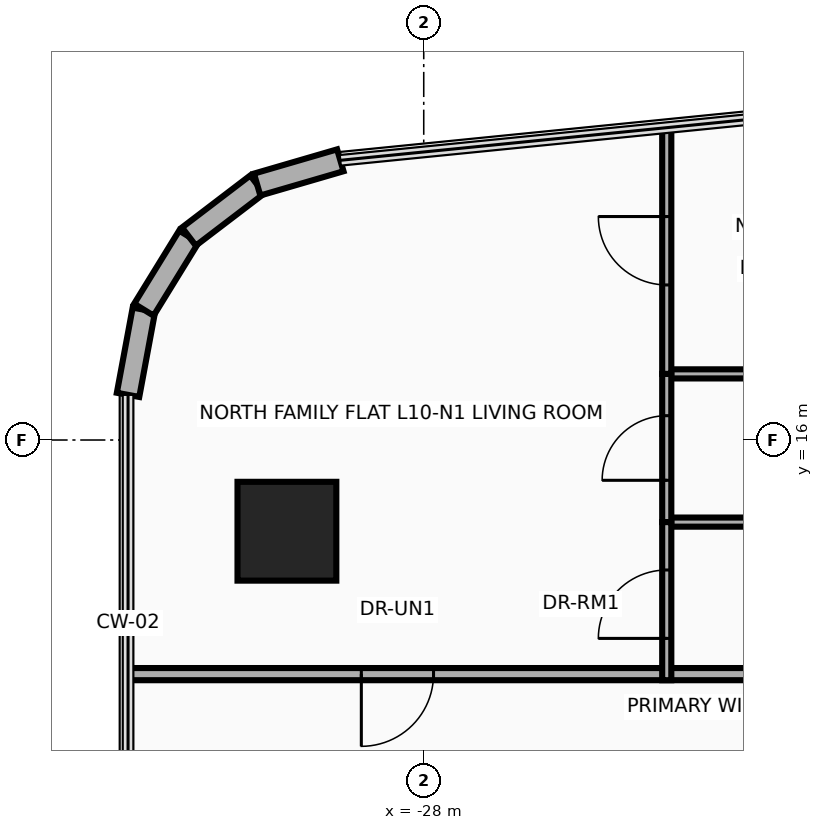
"""IFC4 building model, lengths in metres.
Left out: names, types, materials, properties, quantities, classifications, styles, units other than length and angle.
Written with IfcOpenShell. Run it as: python <this file> out.ifc"""

import sys

from ifc_helpers import new_model, si_unit, direction, frame, frame_2d, origin, origin_2d, place, context, subcontext, project, spatial, rectangle, circle, extrude, source, transform, mapped, element, fill, save


model = new_model("IFC4")
c1 = context("Model", 3, precision=1e-05, world=origin(), true_north=direction((0.0, 1.0)))
c2 = subcontext(c1, "Body", "Model", "MODEL_VIEW")
j1 = project(units=[si_unit("LENGTHUNIT", "METRE"), si_unit("PLANEANGLEUNIT", "RADIAN")], contexts=[c1])
p1 = place(None, origin())
s1 = spatial("IfcSite", under=j1, at=p1, CompositionType="ELEMENT")
p2 = place(p1, origin())
s2 = spatial("IfcBuilding", under=s1, at=p2, CompositionType="ELEMENT")
p3 = place(p2, frame((0.0, 0.0, 44.5)))
s3 = spatial("IfcBuildingStorey", under=s2, at=p3, CompositionType="ELEMENT", Elevation=44.5)
m1 = source(origin(), c2, "Body", "SweptSolid", [
    extrude(circle(Radius=0.65, at=origin_2d()), origin(), (0.0, 0.0, 1.0), 3.7),
])
p4 = place(p3, frame((-29.8, 14.8, 0.0), z_axis=(0.0, 0.0, 1.0), x_axis=(1.0, 0.0, 0.0)))
e1 = element("IfcColumn", 1, at=p4, inside=s3, PredefinedType="COLUMN", context=c2, shape_type="MappedRepresentation", body=[
    mapped(m1, transform((0.0, 0.0, 0.0), x_axis=(1.0, 0.0, 0.0), y_axis=(0.0, 1.0, 0.0), z_axis=(0.0, 0.0, 1.0), scale=1.0)),
])
p5 = place(p3, frame((-31.89, 16.594, 0.0), z_axis=(0.0, 0.0, 1.0), x_axis=(0.182748995683, 0.9831596028, 0.0)))
e2 = element("IfcWall", 2, at=p5, inside=s3, PredefinedType="SOLIDWALL", context=c2, shape_type="SweptSolid", body=[
    extrude(rectangle(XDim=1.14, YDim=0.3, at=frame_2d((0.57, 0.0))), origin(), (0.0, 0.0, 1.0), 3.46),
])
p6 = place(p3, frame((-31.682, 17.714, 0.0), z_axis=(0.0, 0.0, 1.0), x_axis=(0.524157723014, 0.8516212077, 0.0)))
e3 = element("IfcWall", 3, at=p6, inside=s3, PredefinedType="SOLIDWALL", context=c2, shape_type="SweptSolid", body=[
    extrude(rectangle(XDim=1.129, YDim=0.3, at=frame_2d((0.565, 0.0))), origin(), (0.0, 0.0, 1.0), 3.46),
])
p7 = place(p3, frame((-31.09, 18.676, 0.0), z_axis=(0.0, 0.0, 1.0), x_axis=(0.795253002434, 0.606277710393, 0.0)))
e4 = element("IfcWall", 4, at=p7, inside=s3, PredefinedType="SOLIDWALL", context=c2, shape_type="SweptSolid", body=[
    extrude(rectangle(XDim=1.129, YDim=0.3, at=frame_2d((0.564, 0.0))), origin(), (0.0, 0.0, 1.0), 3.46),
])
p8 = place(p3, frame((-30.192, 19.361, 0.0), z_axis=(0.0, 0.0, 1.0), x_axis=(0.960071941549, 0.279753225271, 0.0)))
e5 = element("IfcWall", 5, at=p8, inside=s3, PredefinedType="SOLIDWALL", context=c2, shape_type="SweptSolid", body=[
    extrude(rectangle(XDim=1.14, YDim=0.3, at=frame_2d((0.57, 0.0))), origin(), (0.0, 0.0, 1.0), 3.46),
])
p9 = place(p3, frame((-31.89, 12.92, 0.0), z_axis=(0.0, 0.0, 1.0), x_axis=(1.0, 0.0, 0.0)))
e6 = element("IfcWall", 6, at=p9, inside=s3, PredefinedType="PARTITIONING", context=c2, shape_type="SweptSolid", body=[
    extrude(rectangle(XDim=45.44, YDim=0.16, at=frame_2d((22.72, 0.0))), origin(), (0.0, 0.0, 1.0), 2.583),
])
p10 = place(p9, frame((3.069, 0.0, 0.0)))
e7 = element("IfcOpeningElement", 7, at=p10, cuts=e6, PredefinedType="OPENING", context=c2, shape_type="SweptSolid", body=[
    extrude(rectangle(XDim=0.95, YDim=2.15, at=frame_2d((0.475, 1.075))), frame((0.0, 0.095, 0.0), z_axis=(0.0, -1.0, 0.0), x_axis=(1.0, 0.0, 0.0)), (0.0, 0.0, 1.0), 0.19),
])
p11 = place(p9, frame((17.647, 0.0, 0.0)))
e8 = element("IfcOpeningElement", 8, at=p11, cuts=e6, PredefinedType="OPENING", context=c2, shape_type="SweptSolid", body=[
    extrude(rectangle(XDim=0.95, YDim=2.15, at=frame_2d((0.475, 1.075))), frame((0.0, 0.095, 0.0), z_axis=(0.0, -1.0, 0.0), x_axis=(1.0, 0.0, 0.0)), (0.0, 0.0, 1.0), 0.19),
])
p12 = place(p9, frame((34.227, 0.0, 0.0)))
e9 = element("IfcOpeningElement", 9, at=p12, cuts=e6, PredefinedType="OPENING", context=c2, shape_type="SweptSolid", body=[
    extrude(rectangle(XDim=0.95, YDim=2.15, at=frame_2d((0.475, 1.075))), frame((0.0, 0.095, 0.0), z_axis=(0.0, -1.0, 0.0), x_axis=(1.0, 0.0, 0.0)), (0.0, 0.0, 1.0), 0.19),
])
p13 = place(p3, frame((-24.803, 14.92, 0.0), z_axis=(0.0, 0.0, 1.0), x_axis=(1.0, 0.0, 0.0)))
e10 = element("IfcWall", 10, at=p13, inside=s3, PredefinedType="PARTITIONING", context=c2, shape_type="SweptSolid", body=[
    extrude(rectangle(XDim=8.32, YDim=0.12, at=frame_2d((4.16, 0.0))), origin(), (0.0, 0.0, 1.0), 2.583),
])
p14 = place(p3, frame((-24.803, 16.87, 0.0), z_axis=(0.0, 0.0, 1.0), x_axis=(1.0, 0.0, 0.0)))
e11 = element("IfcWall", 11, at=p14, inside=s3, PredefinedType="PARTITIONING", context=c2, shape_type="SweptSolid", body=[
    extrude(rectangle(XDim=8.32, YDim=0.12, at=frame_2d((4.16, 0.0))), origin(), (0.0, 0.0, 1.0), 3.46),
])
p15 = place(p3, frame((-24.803, 14.92, 0.0), z_axis=(0.0, 0.0, 1.0), x_axis=(0.0, 1.0, 0.0)))
e12 = element("IfcWall", 12, at=p15, inside=s3, PredefinedType="PARTITIONING", context=c2, shape_type="SweptSolid", body=[
    extrude(rectangle(XDim=1.95, YDim=0.12, at=frame_2d((0.975, 0.0))), origin(), (0.0, 0.0, 1.0), 2.583),
])
p16 = place(p15, frame((0.55, 0.0, 0.0)))
e13 = element("IfcOpeningElement", 13, at=p16, cuts=e12, PredefinedType="OPENING", context=c2, shape_type="SweptSolid", body=[
    extrude(rectangle(XDim=0.85, YDim=2.1, at=frame_2d((0.425, 1.05))), frame((0.0, 0.075, 0.0), z_axis=(0.0, -1.0, 0.0), x_axis=(1.0, 0.0, 0.0)), (0.0, 0.0, 1.0), 0.15),
])
p17 = place(p3, frame((-24.803, 12.84, 0.0), z_axis=(0.0, 0.0, 1.0), x_axis=(0.0, 1.0, 0.0)))
e14 = element("IfcWall", 14, at=p17, inside=s3, PredefinedType="PARTITIONING", context=c2, shape_type="SweptSolid", body=[
    extrude(rectangle(XDim=2.08, YDim=0.12, at=frame_2d((1.04, 0.0))), origin(), (0.0, 0.0, 1.0), 2.583),
])
p18 = place(p17, frame((0.55, 0.0, 0.0)))
e15 = element("IfcOpeningElement", 15, at=p18, cuts=e14, PredefinedType="OPENING", context=c2, shape_type="SweptSolid", body=[
    extrude(rectangle(XDim=0.9, YDim=2.1, at=frame_2d((0.45, 1.05))), frame((0.0, 0.075, 0.0), z_axis=(0.0, -1.0, 0.0), x_axis=(1.0, 0.0, 0.0)), (0.0, 0.0, 1.0), 0.15),
])
p19 = place(p3, frame((-24.803, 16.87, 0.0), z_axis=(0.0, 0.0, 1.0), x_axis=(0.0, 1.0, 0.0)))
e16 = element("IfcWall", 16, at=p19, inside=s3, PredefinedType="PARTITIONING", context=c2, shape_type="SweptSolid", body=[
    extrude(rectangle(XDim=3.239, YDim=0.12, at=frame_2d((1.62, 0.0))), origin(), (0.0, 0.0, 1.0), 3.46),
])
p20 = place(p19, frame((1.17, 0.0, 0.0)))
e17 = element("IfcOpeningElement", 17, at=p20, cuts=e16, PredefinedType="OPENING", context=c2, shape_type="SweptSolid", body=[
    extrude(rectangle(XDim=0.9, YDim=2.1, at=frame_2d((0.45, 1.05))), frame((0.0, 0.075, 0.0), z_axis=(0.0, -1.0, 0.0), x_axis=(1.0, 0.0, 0.0)), (0.0, 0.0, 1.0), 0.15),
])
p21 = place(p10, frame((0.95, 0.0, 0.0), z_axis=(0.0, 0.0, 1.0), x_axis=(-1.0, 0.0, 0.0)))
e18 = element("IfcDoor", 18, at=p21, inside=s3, OperationType="SINGLE_SWING_LEFT", PredefinedType="DOOR", context=c2, shape_type="SweptSolid", body=[
    extrude(rectangle(XDim=0.95, YDim=2.15, at=frame_2d((0.475, 1.075))), frame((0.0, 0.025, 0.0), z_axis=(0.0, -1.0, 0.0), x_axis=(1.0, 0.0, 0.0)), (0.0, 0.0, 1.0), 0.05),
])
fill(e7, e18)
p22 = place(p16, origin())
e19 = element("IfcDoor", 19, at=p22, inside=s3, OperationType="SINGLE_SWING_RIGHT", PredefinedType="DOOR", context=c2, shape_type="SweptSolid", body=[
    extrude(rectangle(XDim=0.85, YDim=2.1, at=frame_2d((0.425, 1.05))), frame((0.0, 0.025, 0.0), z_axis=(0.0, -1.0, 0.0), x_axis=(1.0, 0.0, 0.0)), (0.0, 0.0, 1.0), 0.05),
])
fill(e13, e19)
p23 = place(p18, origin())
e20 = element("IfcDoor", 20, at=p23, inside=s3, OperationType="SINGLE_SWING_LEFT", PredefinedType="DOOR", context=c2, shape_type="SweptSolid", body=[
    extrude(rectangle(XDim=0.9, YDim=2.1, at=frame_2d((0.45, 1.05))), frame((0.0, 0.025, 0.0), z_axis=(0.0, -1.0, 0.0), x_axis=(1.0, 0.0, 0.0)), (0.0, 0.0, 1.0), 0.05),
])
fill(e15, e20)
p24 = place(p20, origin())
e21 = element("IfcDoor", 21, at=p24, inside=s3, OperationType="SINGLE_SWING_RIGHT", PredefinedType="DOOR", context=c2, shape_type="SweptSolid", body=[
    extrude(rectangle(XDim=0.9, YDim=2.1, at=frame_2d((0.45, 1.05))), frame((0.0, 0.025, 0.0), z_axis=(0.0, -1.0, 0.0), x_axis=(1.0, 0.0, 0.0)), (0.0, 0.0, 1.0), 0.05),
])
fill(e17, e21)
save(model, sys.argv[1])
